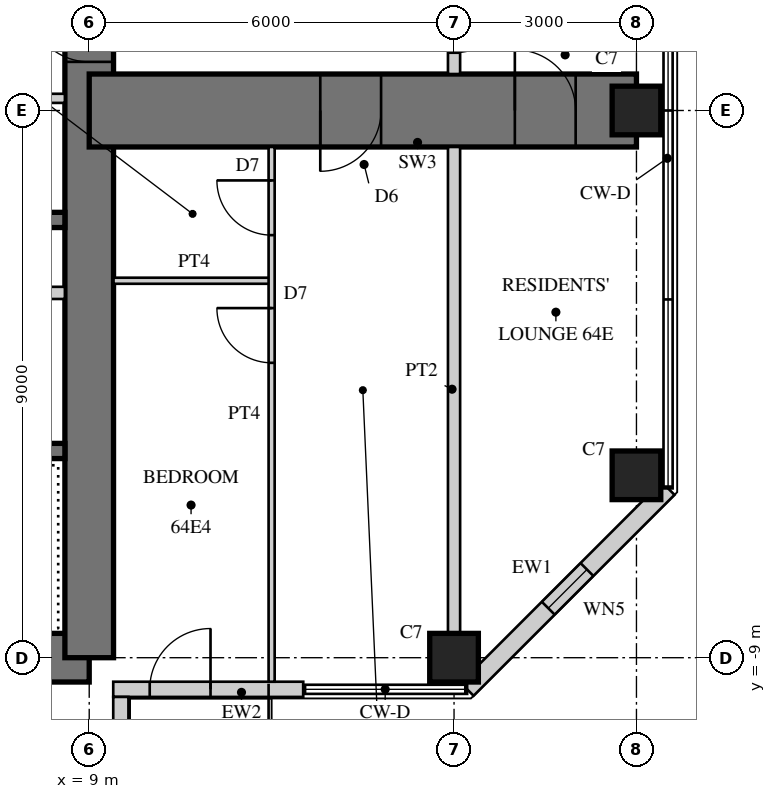
"""IFC4 building model, lengths in metres.
Left out: names, types, materials, properties, quantities, classifications, styles, units other than length and angle.
Written with IfcOpenShell. Run it as: python <this file> out.ifc"""

import sys

from ifc_helpers import new_model, si_unit, direction, frame, frame_2d, origin, origin_2d, place, context, subcontext, project, spatial, rectangle, hollow_rectangle, extrude, element, fill, save


model = new_model("IFC4")
c1 = context("Model", 3, precision=1e-05, world=origin(), true_north=direction((0.0, 1.0)))
c2 = subcontext(c1, "Body", "Model", "MODEL_VIEW")
j1 = project(units=[si_unit("LENGTHUNIT", "METRE"), si_unit("PLANEANGLEUNIT", "RADIAN")], contexts=[c1])
p1 = place(None, origin())
s1 = spatial("IfcSite", under=j1, at=p1, CompositionType="ELEMENT")
p2 = place(p1, origin())
s2 = spatial("IfcBuilding", under=s1, at=p2, CompositionType="ELEMENT")
p3 = place(p2, frame((0.0, 0.0, 249.3)))
s3 = spatial("IfcBuildingStorey", under=s2, at=p3, CompositionType="ELEMENT", Elevation=249.3)
p4 = place(p3, frame((-9.0, -9.0, 0.0), z_axis=(0.0, 0.0, 1.0), x_axis=(1.0, 0.0, 0.0)))
e1 = element("IfcWall", 1, at=p4, inside=s3, PredefinedType="SHEAR", context=c2, shape_type="SweptSolid", body=[
    extrude(rectangle(XDim=18.0, YDim=0.8, at=frame_2d((9.0, 0.0))), origin(), (0.0, 0.0, 1.0), 3.4),
])
p5 = place(p4, frame((9.8, 0.0, 0.0)))
e2 = element("IfcOpeningElement", 2, at=p5, cuts=e1, PredefinedType="OPENING", context=c2, shape_type="SweptSolid", body=[
    extrude(rectangle(XDim=1.0, YDim=2.4, at=frame_2d((0.5, 1.2))), frame((0.0, 0.41, 0.0), z_axis=(0.0, -1.0, 0.0), x_axis=(1.0, 0.0, 0.0)), (0.0, 0.0, 1.0), 0.82),
])
p6 = place(p3, frame((9.0, -9.0, 0.0), z_axis=(0.0, 0.0, 1.0), x_axis=(0.0, 1.0, 0.0)))
e3 = element("IfcWall", 3, at=p6, inside=s3, PredefinedType="SHEAR", context=c2, shape_type="SweptSolid", body=[
    extrude(rectangle(XDim=18.0, YDim=0.8, at=frame_2d((9.0, 0.0))), origin(), (0.0, 0.0, 1.0), 3.4),
])
p7 = place(p6, frame((9.8, 0.0, 0.0)))
e4 = element("IfcOpeningElement", 4, at=p7, cuts=e3, PredefinedType="OPENING", context=c2, shape_type="SweptSolid", body=[
    extrude(rectangle(XDim=1.0, YDim=2.4, at=frame_2d((0.5, 1.2))), frame((0.0, 0.41, 0.0), z_axis=(0.0, -1.0, 0.0), x_axis=(1.0, 0.0, 0.0)), (0.0, 0.0, 1.0), 0.82),
])
p8 = place(p3, frame((2.125, -1.8, 0.0), z_axis=(0.0, 0.0, 1.0), x_axis=(1.0, 0.0, 0.0)))
e5 = element("IfcWall", 5, at=p8, inside=s3, PredefinedType="SHEAR", context=c2, shape_type="SweptSolid", body=[
    extrude(rectangle(XDim=6.475, YDim=0.25, at=frame_2d((3.238, 0.0))), origin(), (0.0, 0.0, 1.0), 3.4),
])
p9 = place(p3, frame((2.125, -5.6, 0.0), z_axis=(0.0, 0.0, 1.0), x_axis=(1.0, 0.0, 0.0)))
e6 = element("IfcWall", 6, at=p9, inside=s3, PredefinedType="SHEAR", context=c2, shape_type="SweptSolid", body=[
    extrude(rectangle(XDim=6.475, YDim=0.25, at=frame_2d((3.238, 0.0))), origin(), (0.0, 0.0, 1.0), 3.4),
])
p10 = place(p9, frame((0.175, 0.0, 0.0)))
e7 = element("IfcOpeningElement", 7, at=p10, cuts=e6, PredefinedType="OPENING", context=c2, shape_type="SweptSolid", body=[
    extrude(rectangle(XDim=1.0, YDim=2.1, at=frame_2d((0.5, 1.05))), frame((0.0, 0.135, 0.0), z_axis=(0.0, -1.0, 0.0), x_axis=(1.0, 0.0, 0.0)), (0.0, 0.0, 1.0), 0.27),
])
p11 = place(p3, frame((5.725, -3.0, 0.0), z_axis=(0.0, 0.0, 1.0), x_axis=(1.0, 0.0, 0.0)))
e8 = element("IfcWall", 8, at=p11, inside=s3, PredefinedType="PARTITIONING", context=c2, shape_type="SweptSolid", body=[
    extrude(rectangle(XDim=2.875, YDim=0.2, at=frame_2d((1.438, 0.0))), origin(), (0.0, 0.0, 1.0), 3.4),
])
p12 = place(p3, frame((9.0, 0.0, 0.0), z_axis=(0.0, 0.0, 1.0), x_axis=(1.0, 0.0, 0.0)))
e9 = element("IfcWall", 9, at=p12, inside=s3, PredefinedType="SHEAR", context=c2, shape_type="SweptSolid", body=[
    extrude(rectangle(XDim=9.0, YDim=1.2, at=frame_2d((4.5, 0.0))), origin(), (0.0, 0.0, 1.0), 3.4),
])
p13 = place(p12, frame((3.8, 0.0, 0.0)))
e10 = element("IfcOpeningElement", 10, at=p13, cuts=e9, PredefinedType="OPENING", context=c2, shape_type="SweptSolid", body=[
    extrude(rectangle(XDim=1.0, YDim=2.15, at=frame_2d((0.5, 1.075))), frame((0.0, 0.61, 0.0), z_axis=(0.0, -1.0, 0.0), x_axis=(1.0, 0.0, 0.0)), (0.0, 0.0, 1.0), 1.22),
])
p14 = place(p12, frame((7.0, 0.0, 0.0)))
e11 = element("IfcOpeningElement", 11, at=p14, cuts=e9, PredefinedType="OPENING", context=c2, shape_type="SweptSolid", body=[
    extrude(rectangle(XDim=1.0, YDim=2.2, at=frame_2d((0.5, 1.1))), frame((0.0, 0.61, 0.0), z_axis=(0.0, -1.0, 0.0), x_axis=(1.0, 0.0, 0.0)), (0.0, 0.0, 1.0), 1.22),
])
for number, where, z_axis, x_axis in (
    (12, (15.0, -9.0, 0.0), (0.0, 0.0, 1.0), (1.0, 0.0, 0.0)),
    (13, (18.0, -6.0, 0.0), (0.0, 0.0, 1.0), (1.0, 0.0, 0.0)),
    (14, (18.0, 0.0, 0.0), (0.0, 0.0, 1.0), (1.0, 0.0, 0.0)),
):
    element("IfcColumn", number, at=place(p3, frame(where, z_axis=z_axis, x_axis=x_axis)), inside=s3, PredefinedType="COLUMN", context=c2, shape_type="SweptSolid", body=[
        extrude(rectangle(XDim=0.8, YDim=0.8, at=origin_2d()), origin(), (0.0, 0.0, 1.0), 3.4),
    ])
p15 = place(p3, frame((9.395, -9.52, 0.0), z_axis=(0.0, 0.0, 1.0), x_axis=(1.0, 0.0, 0.0)))
e15 = element("IfcWall", 15, at=p15, inside=s3, PredefinedType="SOLIDWALL", context=c2, shape_type="SweptSolid", body=[
    extrude(rectangle(XDim=3.125, YDim=0.25, at=frame_2d((1.562, 0.0))), origin(), (0.0, 0.0, 1.0), 3.15),
])
p16 = place(p15, frame((0.6, 0.0, 0.0)))
e16 = element("IfcOpeningElement", 16, at=p16, cuts=e15, PredefinedType="OPENING", context=c2, shape_type="SweptSolid", body=[
    extrude(rectangle(XDim=1.0, YDim=2.2, at=frame_2d((0.5, 1.1))), frame((0.0, 0.135, 0.0), z_axis=(0.0, -1.0, 0.0), x_axis=(1.0, 0.0, 0.0)), (0.0, 0.0, 1.0), 0.27),
])
p17 = place(p3, frame((15.215, -9.52, 0.0), z_axis=(0.0, 0.0, 1.0), x_axis=(0.707106781187, 0.707106781187, 0.0)))
e17 = element("IfcWall", 17, at=p17, inside=s3, PredefinedType="SOLIDWALL", context=c2, shape_type="SweptSolid", body=[
    extrude(rectangle(XDim=4.674, YDim=0.3, at=frame_2d((2.337, 0.0))), origin(), (0.0, 0.0, 1.0), 3.15),
])
p18 = place(p17, frame((1.887, 0.0, 0.3)))
e18 = element("IfcOpeningElement", 18, at=p18, cuts=e17, PredefinedType="OPENING", context=c2, shape_type="SweptSolid", body=[
    extrude(rectangle(XDim=0.9, YDim=2.4, at=frame_2d((0.45, 1.2))), frame((0.0, 0.16, 0.0), z_axis=(0.0, -1.0, 0.0), x_axis=(1.0, 0.0, 0.0)), (0.0, 0.0, 1.0), 0.32),
])
p19 = place(p3, frame((9.52, -12.52, 0.0), z_axis=(0.0, 0.0, 1.0), x_axis=(0.0, 1.0, 0.0)))
e19 = element("IfcWall", 19, at=p19, inside=s3, PredefinedType="SOLIDWALL", context=c2, shape_type="SweptSolid", body=[
    extrude(rectangle(XDim=2.875, YDim=0.25, at=frame_2d((1.438, 0.0))), origin(), (0.0, 0.0, 1.0), 3.15),
])
p20 = place(p19, frame((0.6, 0.0, 0.0)))
e20 = element("IfcOpeningElement", 20, at=p20, cuts=e19, PredefinedType="OPENING", context=c2, shape_type="SweptSolid", body=[
    extrude(rectangle(XDim=1.0, YDim=2.2, at=frame_2d((0.5, 1.1))), frame((0.0, 0.135, 0.0), z_axis=(0.0, -1.0, 0.0), x_axis=(1.0, 0.0, 0.0)), (0.0, 0.0, 1.0), 0.27),
])
p21 = place(p3, frame((2.325, 0.2, 0.0), z_axis=(0.0, 0.0, 1.0), x_axis=(1.0, 0.0, 0.0)))
e21 = element("IfcWall", 21, at=p21, inside=s3, PredefinedType="PARTITIONING", context=c2, shape_type="SweptSolid", body=[
    extrude(rectangle(XDim=6.275, YDim=0.15, at=frame_2d((3.138, 0.0))), origin(), (0.0, 0.0, 1.0), 3.15),
])
p22 = place(p21, frame((0.4, 0.0, 0.0)))
e22 = element("IfcOpeningElement", 22, at=p22, cuts=e21, PredefinedType="OPENING", context=c2, shape_type="SweptSolid", body=[
    extrude(rectangle(XDim=1.0, YDim=2.1, at=frame_2d((0.5, 1.05))), frame((0.0, 0.085, 0.0), z_axis=(0.0, -1.0, 0.0), x_axis=(1.0, 0.0, 0.0)), (0.0, 0.0, 1.0), 0.17),
])
p23 = place(p3, frame((9.4, -2.8, 0.0), z_axis=(0.0, 0.0, 1.0), x_axis=(1.0, 0.0, 0.0)))
e23 = element("IfcWall", 23, at=p23, inside=s3, PredefinedType="PARTITIONING", context=c2, shape_type="SweptSolid", body=[
    extrude(rectangle(XDim=2.65, YDim=0.1, at=frame_2d((1.325, 0.0))), origin(), (0.0, 0.0, 1.0), 3.15),
])
p24 = place(p3, frame((12.0, -9.395, 0.0), z_axis=(0.0, 0.0, 1.0), x_axis=(0.0, 1.0, 0.0)))
e24 = element("IfcWall", 24, at=p24, inside=s3, PredefinedType="PARTITIONING", context=c2, shape_type="SweptSolid", body=[
    extrude(rectangle(XDim=8.795, YDim=0.1, at=frame_2d((4.397, 0.0))), origin(), (0.0, 0.0, 1.0), 3.15),
])
p25 = place(p24, frame((5.245, 0.0, 0.0)))
e25 = element("IfcOpeningElement", 25, at=p25, cuts=e24, PredefinedType="OPENING", context=c2, shape_type="SweptSolid", body=[
    extrude(rectangle(XDim=0.9, YDim=2.1, at=frame_2d((0.45, 1.05))), frame((0.0, 0.06, 0.0), z_axis=(0.0, -1.0, 0.0), x_axis=(1.0, 0.0, 0.0)), (0.0, 0.0, 1.0), 0.12),
])
p26 = place(p24, frame((7.345, 0.0, 0.0)))
e26 = element("IfcOpeningElement", 26, at=p26, cuts=e24, PredefinedType="OPENING", context=c2, shape_type="SweptSolid", body=[
    extrude(rectangle(XDim=0.9, YDim=2.1, at=frame_2d((0.45, 1.05))), frame((0.0, 0.06, 0.0), z_axis=(0.0, -1.0, 0.0), x_axis=(1.0, 0.0, 0.0)), (0.0, 0.0, 1.0), 0.12),
])
p27 = place(p3, frame((15.0, -8.6, 0.0), z_axis=(0.0, 0.0, 1.0), x_axis=(0.0, 1.0, 0.0)))
e27 = element("IfcWall", 27, at=p27, inside=s3, PredefinedType="SOLIDWALL", context=c2, shape_type="SweptSolid", body=[
    extrude(rectangle(XDim=8.0, YDim=0.2, at=frame_2d((4.0, 0.0))), origin(), (0.0, 0.0, 1.0), 2.1),
])
p28 = place(p3, frame((15.0, 0.6, 0.0), z_axis=(0.0, 0.0, 1.0), x_axis=(0.0, 1.0, 0.0)))
e28 = element("IfcWall", 28, at=p28, inside=s3, PredefinedType="SOLIDWALL", context=c2, shape_type="SweptSolid", body=[
    extrude(rectangle(XDim=8.0, YDim=0.2, at=frame_2d((4.0, 0.0))), origin(), (0.0, 0.0, 1.0), 2.1),
])
p29 = place(p28, frame((0.35, 0.0, 0.0)))
e29 = element("IfcOpeningElement", 29, at=p29, cuts=e28, PredefinedType="OPENING", context=c2, shape_type="SweptSolid", body=[
    extrude(rectangle(XDim=1.0, YDim=2.0, at=frame_2d((0.5, 1.0))), frame((0.0, 0.11, 0.0), z_axis=(0.0, -1.0, 0.0), x_axis=(1.0, 0.0, 0.0)), (0.0, 0.0, 1.0), 0.22),
])
p30 = place(p16, origin())
e30 = element("IfcDoor", 30, at=p30, inside=s3, OperationType="SINGLE_SWING_RIGHT", PredefinedType="DOOR", context=c2, shape_type="SweptSolid", body=[
    extrude(hollow_rectangle(XDim=1.0, YDim=2.2, WallThickness=0.06, at=frame_2d((0.5, 1.1))), frame((0.0, 0.025, 0.0), z_axis=(0.0, -1.0, 0.0), x_axis=(1.0, 0.0, 0.0)), (0.0, 0.0, 1.0), 0.05),
    extrude(rectangle(XDim=0.879, YDim=2.079, at=frame_2d((0.5, 1.1))), frame((0.0, 0.025, 0.0), z_axis=(0.0, -1.0, 0.0), x_axis=(1.0, 0.0, 0.0)), (0.0, 0.0, 1.0), 0.05),
])
fill(e16, e30)
p31 = place(p18, origin())
e31 = element("IfcWindow", 31, at=p31, inside=s3, PartitioningType="SINGLE_PANEL", PredefinedType="WINDOW", context=c2, shape_type="SweptSolid", body=[
    extrude(hollow_rectangle(XDim=0.9, YDim=2.4, WallThickness=0.06, at=frame_2d((0.45, 1.2))), frame((0.0, 0.03, 0.0), z_axis=(0.0, -1.0, 0.0), x_axis=(1.0, 0.0, 0.0)), (0.0, 0.0, 1.0), 0.06),
    extrude(rectangle(XDim=0.779, YDim=2.279, at=frame_2d((0.45, 1.2))), frame((0.0, 0.03, 0.0), z_axis=(0.0, -1.0, 0.0), x_axis=(1.0, 0.0, 0.0)), (0.0, 0.0, 1.0), 0.06),
])
fill(e18, e31)
p32 = place(p25, origin())
e32 = element("IfcDoor", 32, at=p32, inside=s3, OperationType="SINGLE_SWING_RIGHT", PredefinedType="DOOR", context=c2, shape_type="SweptSolid", body=[
    extrude(rectangle(XDim=0.9, YDim=2.1, at=frame_2d((0.45, 1.05))), frame((0.0, 0.025, 0.0), z_axis=(0.0, -1.0, 0.0), x_axis=(1.0, 0.0, 0.0)), (0.0, 0.0, 1.0), 0.05),
])
fill(e25, e32)
p33 = place(p26, origin())
e33 = element("IfcDoor", 33, at=p33, inside=s3, OperationType="SINGLE_SWING_RIGHT", PredefinedType="DOOR", context=c2, shape_type="SweptSolid", body=[
    extrude(rectangle(XDim=0.9, YDim=2.1, at=frame_2d((0.45, 1.05))), frame((0.0, 0.025, 0.0), z_axis=(0.0, -1.0, 0.0), x_axis=(1.0, 0.0, 0.0)), (0.0, 0.0, 1.0), 0.05),
])
fill(e26, e33)
p34 = place(p29, frame((1.0, 0.0, 0.0), z_axis=(0.0, 0.0, 1.0), x_axis=(-1.0, 0.0, 0.0)))
e34 = element("IfcDoor", 34, at=p34, inside=s3, OperationType="SINGLE_SWING_LEFT", PredefinedType="DOOR", context=c2, shape_type="SweptSolid", body=[
    extrude(rectangle(XDim=1.0, YDim=2.0, at=frame_2d((0.5, 1.0))), frame((0.0, 0.025, 0.0), z_axis=(0.0, -1.0, 0.0), x_axis=(1.0, 0.0, 0.0)), (0.0, 0.0, 1.0), 0.05),
])
fill(e29, e34)
p35 = place(p13, frame((1.0, 0.0, 0.0), z_axis=(0.0, 0.0, 1.0), x_axis=(-1.0, 0.0, 0.0)))
e35 = element("IfcDoor", 35, at=p35, inside=s3, OperationType="SINGLE_SWING_RIGHT", PredefinedType="DOOR", context=c2, shape_type="SweptSolid", body=[
    extrude(rectangle(XDim=1.0, YDim=2.15, at=frame_2d((0.5, 1.075))), frame((0.0, 0.025, 0.0), z_axis=(0.0, -1.0, 0.0), x_axis=(1.0, 0.0, 0.0)), (0.0, 0.0, 1.0), 0.05),
])
fill(e10, e35)
p36 = place(p14, origin())
e36 = element("IfcDoor", 36, at=p36, inside=s3, OperationType="SINGLE_SWING_LEFT", PredefinedType="DOOR", context=c2, shape_type="SweptSolid", body=[
    extrude(rectangle(XDim=1.0, YDim=2.2, at=frame_2d((0.5, 1.1))), frame((0.0, 0.025, 0.0), z_axis=(0.0, -1.0, 0.0), x_axis=(1.0, 0.0, 0.0)), (0.0, 0.0, 1.0), 0.05),
])
fill(e11, e36)
p37 = place(p7, origin())
e37 = element("IfcDoor", 37, at=p37, inside=s3, OperationType="SINGLE_SWING_RIGHT", PredefinedType="DOOR", context=c2, shape_type="SweptSolid", body=[
    extrude(rectangle(XDim=1.0, YDim=2.4, at=frame_2d((0.5, 1.2))), frame((0.0, 0.055, 0.0), z_axis=(0.0, -1.0, 0.0), x_axis=(1.0, 0.0, 0.0)), (0.0, 0.0, 1.0), 0.05),
])
fill(e4, e37)
save(model, sys.argv[1])
